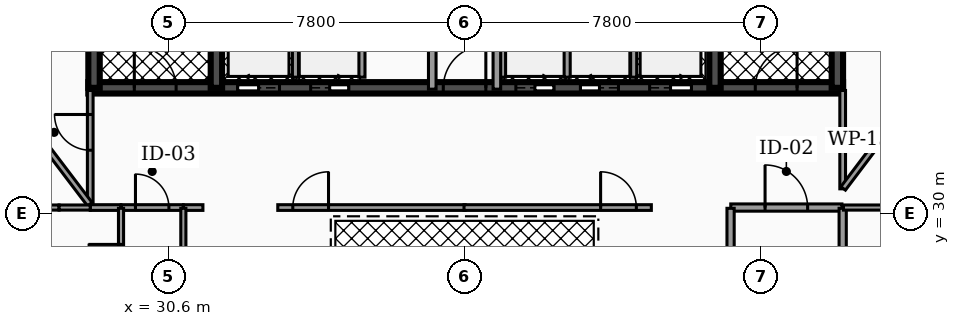
"""IFC4 building model, lengths in metres.
Left out: names, types, materials, properties, quantities, classifications, styles, units other than length and angle.
Written with IfcOpenShell. Run it as: python <this file> out.ifc"""

import sys

from ifc_helpers import new_model, si_unit, direction, frame, frame_2d, origin, place, context, subcontext, project, spatial, rectangle, extrude, element, fill, save


model = new_model("IFC4")
c1 = context("Model", 3, precision=1e-05, world=origin(), true_north=direction((0.0, 1.0)))
c2 = subcontext(c1, "Body", "Model", "MODEL_VIEW")
j1 = project(units=[si_unit("LENGTHUNIT", "METRE"), si_unit("PLANEANGLEUNIT", "RADIAN")], contexts=[c1])
p1 = place(None, origin())
s1 = spatial("IfcSite", under=j1, at=p1, CompositionType="ELEMENT")
p2 = place(p1, origin())
s2 = spatial("IfcBuilding", under=s1, at=p2, CompositionType="ELEMENT")
p3 = place(p2, frame((0.0, 0.0, 268.6)))
s3 = spatial("IfcBuildingStorey", under=s2, at=p3, CompositionType="ELEMENT", Elevation=268.6)
p4 = place(p3, frame((28.5, 33.3, 0.0), z_axis=(0.0, 0.0, 1.0), x_axis=(1.0, 0.0, 0.0)))
e1 = element("IfcWall", 1, at=p4, inside=s3, PredefinedType="SHEAR", context=c2, shape_type="SweptSolid", body=[
    extrude(rectangle(XDim=19.86, YDim=0.3, at=frame_2d((9.93, 0.0))), origin(), (0.0, 0.0, 1.0), 3.18),
])
p5 = place(p4, frame((3.93, 0.0, 0.0)))
e2 = element("IfcOpeningElement", 2, at=p5, cuts=e1, PredefinedType="OPENING", context=c2, shape_type="SweptSolid", body=[
    extrude(rectangle(XDim=1.1, YDim=2.15, at=frame_2d((0.55, 1.075))), frame((0.0, 0.16, 0.0), z_axis=(0.0, -1.0, 0.0), x_axis=(1.0, 0.0, 0.0)), (0.0, 0.0, 1.0), 0.32),
])
p6 = place(p4, frame((14.77, 0.0, 0.0)))
e3 = element("IfcOpeningElement", 3, at=p6, cuts=e1, PredefinedType="OPENING", context=c2, shape_type="SweptSolid", body=[
    extrude(rectangle(XDim=1.1, YDim=2.15, at=frame_2d((0.55, 1.075))), frame((0.0, 0.16, 0.0), z_axis=(0.0, -1.0, 0.0), x_axis=(1.0, 0.0, 0.0)), (0.0, 0.0, 1.0), 0.32),
])
p7 = place(p4, frame((11.25, 0.0, 0.0)))
e4 = element("IfcOpeningElement", 4, at=p7, cuts=e1, PredefinedType="OPENING", context=c2, shape_type="SweptSolid", body=[
    extrude(rectangle(XDim=1.0, YDim=2.1, at=frame_2d((0.5, 1.05))), frame((0.0, 0.16, 0.0), z_axis=(0.0, -1.0, 0.0), x_axis=(1.0, 0.0, 0.0)), (0.0, 0.0, 1.0), 0.32),
])
p8 = place(p4, frame((12.95, 0.0, 0.0)))
e5 = element("IfcOpeningElement", 5, at=p8, cuts=e1, PredefinedType="OPENING", context=c2, shape_type="SweptSolid", body=[
    extrude(rectangle(XDim=1.0, YDim=2.1, at=frame_2d((0.5, 1.05))), frame((0.0, 0.16, 0.0), z_axis=(0.0, -1.0, 0.0), x_axis=(1.0, 0.0, 0.0)), (0.0, 0.0, 1.0), 0.32),
])
p9 = place(p4, frame((5.85, 0.0, 0.0)))
e6 = element("IfcOpeningElement", 6, at=p9, cuts=e1, PredefinedType="OPENING", context=c2, shape_type="SweptSolid", body=[
    extrude(rectangle(XDim=1.0, YDim=2.1, at=frame_2d((0.5, 1.05))), frame((0.0, 0.16, 0.0), z_axis=(0.0, -1.0, 0.0), x_axis=(1.0, 0.0, 0.0)), (0.0, 0.0, 1.0), 0.32),
])
p10 = place(p4, frame((1.21, 0.0, 0.0)))
e7 = element("IfcOpeningElement", 7, at=p10, cuts=e1, PredefinedType="OPENING", context=c2, shape_type="SweptSolid", body=[
    extrude(rectangle(XDim=1.1, YDim=2.2, at=frame_2d((0.55, 1.1))), frame((0.0, 0.16, 0.0), z_axis=(0.0, -1.0, 0.0), x_axis=(1.0, 0.0, 0.0)), (0.0, 0.0, 1.0), 0.32),
])
p11 = place(p4, frame((9.34, 0.0, 0.0)))
e8 = element("IfcOpeningElement", 8, at=p11, cuts=e1, PredefinedType="OPENING", context=c2, shape_type="SweptSolid", body=[
    extrude(rectangle(XDim=1.12, YDim=2.05, at=frame_2d((0.56, 1.025))), frame((0.0, 0.16, 0.0), z_axis=(0.0, -1.0, 0.0), x_axis=(1.0, 0.0, 0.0)), (0.0, 0.0, 1.0), 0.32),
])
p12 = place(p4, frame((17.55, 0.0, 0.0)))
e9 = element("IfcOpeningElement", 9, at=p12, cuts=e1, PredefinedType="OPENING", context=c2, shape_type="SweptSolid", body=[
    extrude(rectangle(XDim=1.1, YDim=2.2, at=frame_2d((0.55, 1.1))), frame((0.0, 0.16, 0.0), z_axis=(0.0, -1.0, 0.0), x_axis=(1.0, 0.0, 0.0)), (0.0, 0.0, 1.0), 0.32),
])
for number, where, z_axis, x_axis in (
    (10, (28.65, 33.3, 0.0), (0.0, 0.0, 1.0), (0.0, 1.0, 0.0)),
    (11, (31.87, 33.3, 0.0), (0.0, 0.0, 1.0), (0.0, 1.0, 0.0)),
    (12, (44.99, 33.3, 0.0), (0.0, 0.0, 1.0), (0.0, 1.0, 0.0)),
    (13, (48.21, 33.3, 0.0), (0.0, 0.0, 1.0), (0.0, 1.0, 0.0)),
):
    element("IfcWall", number, at=place(p3, frame(where, z_axis=z_axis, x_axis=x_axis)), inside=s3, PredefinedType="SHEAR", context=c2, shape_type="SweptSolid", body=[
        extrude(rectangle(XDim=10.1, YDim=0.3, at=frame_2d((5.05, 0.0))), origin(), (0.0, 0.0, 1.0), 3.18),
    ])
for number, where, z_axis, x_axis in (
    (14, (33.95, 33.58, 0.0), (0.0, 0.0, 1.0), (0.0, 1.0, 0.0)),
    (15, (42.85, 33.58, 0.0), (0.0, 0.0, 1.0), (0.0, 1.0, 0.0)),
):
    element("IfcWall", number, at=place(p3, frame(where, z_axis=z_axis, x_axis=x_axis)), inside=s3, PredefinedType="SOLIDWALL", context=c2, shape_type="SweptSolid", body=[
        extrude(rectangle(XDim=2.45, YDim=0.16, at=frame_2d((1.225, 0.0))), origin(), (0.0, 0.0, 1.0), 3.18),
    ])
for number, where, z_axis, x_axis in (
    (16, (39.4, 33.58, 0.0), (0.0, 0.0, 1.0), (0.0, 1.0, 0.0)),
    (17, (41.1, 33.58, 0.0), (0.0, 0.0, 1.0), (0.0, 1.0, 0.0)),
    (18, (35.7, 33.58, 0.0), (0.0, 0.0, 1.0), (0.0, 1.0, 0.0)),
):
    element("IfcWall", number, at=place(p3, frame(where, z_axis=z_axis, x_axis=x_axis)), inside=s3, PredefinedType="SOLIDWALL", context=c2, shape_type="SweptSolid", body=[
        extrude(rectangle(XDim=2.25, YDim=0.16, at=frame_2d((1.125, 0.0))), origin(), (0.0, 0.0, 1.0), 3.18),
    ])
p13 = place(p3, frame((37.55, 33.265, 0.0), z_axis=(0.0, 0.0, 1.0), x_axis=(0.0, 1.0, 0.0)))
e19 = element("IfcWall", 19, at=p13, inside=s3, PredefinedType="PARTITIONING", context=c2, shape_type="SweptSolid", body=[
    extrude(rectangle(XDim=3.615, YDim=0.2, at=frame_2d((1.808, 0.0))), origin(), (0.0, 0.0, 1.0), 2.235),
])
p14 = place(p13, frame((1.367, 0.0, 0.0)))
e20 = element("IfcOpeningElement", 20, at=p14, cuts=e19, PredefinedType="OPENING", context=c2, shape_type="SweptSolid", body=[
    extrude(rectangle(XDim=0.88, YDim=2.05, at=frame_2d((0.44, 1.025))), frame((0.0, 0.11, 0.0), z_axis=(0.0, -1.0, 0.0), x_axis=(1.0, 0.0, 0.0)), (0.0, 0.0, 1.0), 0.22),
])
p15 = place(p3, frame((39.25, 33.265, 0.0), z_axis=(0.0, 0.0, 1.0), x_axis=(0.0, 1.0, 0.0)))
e21 = element("IfcWall", 21, at=p15, inside=s3, PredefinedType="PARTITIONING", context=c2, shape_type="SweptSolid", body=[
    extrude(rectangle(XDim=3.615, YDim=0.2, at=frame_2d((1.808, 0.0))), origin(), (0.0, 0.0, 1.0), 2.235),
])
p16 = place(p3, frame((45.405, 30.15, 0.0), z_axis=(0.0, 0.0, 1.0), x_axis=(1.0, 0.0, 0.0)))
e22 = element("IfcWall", 22, at=p16, inside=s3, PredefinedType="PARTITIONING", context=c2, shape_type="SweptSolid", body=[
    extrude(rectangle(XDim=2.925, YDim=0.19, at=frame_2d((1.462, 0.0))), origin(), (0.0, 0.0, 1.0), 2.235),
])
p17 = place(p16, frame((0.903, 0.0, 0.0)))
e23 = element("IfcOpeningElement", 23, at=p17, cuts=e22, PredefinedType="OPENING", context=c2, shape_type="SweptSolid", body=[
    extrude(rectangle(XDim=1.12, YDim=2.05, at=frame_2d((0.56, 1.025))), frame((0.0, 0.105, 0.0), z_axis=(0.0, -1.0, 0.0), x_axis=(1.0, 0.0, 0.0)), (0.0, 0.0, 1.0), 0.21),
])
p18 = place(p3, frame((28.55, 30.227, 0.0), z_axis=(0.0, 0.0, 1.0), x_axis=(0.0, 1.0, 0.0)))
e24 = element("IfcWall", 24, at=p18, inside=s3, PredefinedType="PARTITIONING", context=c2, shape_type="SweptSolid", body=[
    extrude(rectangle(XDim=3.003, YDim=0.15, at=frame_2d((1.501, 0.0))), origin(), (0.0, 0.0, 1.0), 2.235),
])
p19 = place(p18, frame((1.431, 0.0, 0.0)))
e25 = element("IfcOpeningElement", 25, at=p19, cuts=e24, PredefinedType="OPENING", context=c2, shape_type="SweptSolid", body=[
    extrude(rectangle(XDim=0.94, YDim=2.05, at=frame_2d((0.47, 1.025))), frame((0.0, 0.085, 0.0), z_axis=(0.0, -1.0, 0.0), x_axis=(1.0, 0.0, 0.0)), (0.0, 0.0, 1.0), 0.17),
])
p20 = place(p3, frame((48.35, 30.643, 0.0), z_axis=(0.0, 0.0, 1.0), x_axis=(0.0, 1.0, 0.0)))
e26 = element("IfcWall", 26, at=p20, inside=s3, PredefinedType="PARTITIONING", context=c2, shape_type="SweptSolid", body=[
    extrude(rectangle(XDim=2.587, YDim=0.15, at=frame_2d((1.294, 0.0))), origin(), (0.0, 0.0, 1.0), 2.235),
])
p21 = place(p3, frame((29.365, 30.15, 0.0), z_axis=(0.0, 0.0, 1.0), x_axis=(1.0, 0.0, 0.0)))
e27 = element("IfcWall", 27, at=p21, inside=s3, PredefinedType="PARTITIONING", context=c2, shape_type="SweptSolid", body=[
    extrude(rectangle(XDim=1.63, YDim=0.15, at=frame_2d((0.815, 0.0))), origin(), (0.0, 0.0, 1.0), 2.235),
])
p22 = place(p21, frame((0.375, 0.0, 0.0)))
e28 = element("IfcOpeningElement", 28, at=p22, cuts=e27, PredefinedType="OPENING", context=c2, shape_type="SweptSolid", body=[
    extrude(rectangle(XDim=0.88, YDim=2.05, at=frame_2d((0.44, 1.025))), frame((0.0, 0.085, 0.0), z_axis=(0.0, -1.0, 0.0), x_axis=(1.0, 0.0, 0.0)), (0.0, 0.0, 1.0), 0.17),
])
p23 = place(p3, frame((28.55, 30.15, 0.0), z_axis=(0.0, 0.0, 1.0), x_axis=(1.0, 0.0, 0.0)))
e29 = element("IfcWall", 29, at=p23, inside=s3, PredefinedType="PARTITIONING", context=c2, shape_type="SweptSolid", body=[
    extrude(rectangle(XDim=0.805, YDim=0.15, at=frame_2d((0.402, 0.0))), origin(), (0.0, 0.0, 1.0), 2.235),
])
p24 = place(p3, frame((33.485, 30.15, 0.0), z_axis=(0.0, 0.0, 1.0), x_axis=(1.0, 0.0, 0.0)))
e30 = element("IfcWall", 30, at=p24, inside=s3, PredefinedType="PARTITIONING", context=c2, shape_type="SweptSolid", body=[
    extrude(rectangle(XDim=4.93, YDim=0.15, at=frame_2d((2.465, 0.0))), origin(), (0.0, 0.0, 1.0), 2.235),
])
p25 = place(p24, frame((0.395, 0.0, 0.0)))
e31 = element("IfcOpeningElement", 31, at=p25, cuts=e30, PredefinedType="OPENING", context=c2, shape_type="SweptSolid", body=[
    extrude(rectangle(XDim=0.94, YDim=2.05, at=frame_2d((0.47, 1.025))), frame((0.0, 0.085, 0.0), z_axis=(0.0, -1.0, 0.0), x_axis=(1.0, 0.0, 0.0)), (0.0, 0.0, 1.0), 0.17),
])
p26 = place(p3, frame((31.005, 30.15, 0.0), z_axis=(0.0, 0.0, 1.0), x_axis=(1.0, 0.0, 0.0)))
e32 = element("IfcWall", 32, at=p26, inside=s3, PredefinedType="PARTITIONING", context=c2, shape_type="SweptSolid", body=[
    extrude(rectangle(XDim=0.51, YDim=0.15, at=frame_2d((0.255, 0.0))), origin(), (0.0, 0.0, 1.0), 2.235),
])
p27 = place(p3, frame((38.385, 30.15, 0.0), z_axis=(0.0, 0.0, 1.0), x_axis=(1.0, 0.0, 0.0)))
e33 = element("IfcWall", 33, at=p27, inside=s3, PredefinedType="PARTITIONING", context=c2, shape_type="SweptSolid", body=[
    extrude(rectangle(XDim=4.93, YDim=0.15, at=frame_2d((2.465, 0.0))), origin(), (0.0, 0.0, 1.0), 2.235),
])
p28 = place(p27, frame((3.595, 0.0, 0.0)))
e34 = element("IfcOpeningElement", 34, at=p28, cuts=e33, PredefinedType="OPENING", context=c2, shape_type="SweptSolid", body=[
    extrude(rectangle(XDim=0.94, YDim=2.05, at=frame_2d((0.47, 1.025))), frame((0.0, 0.085, 0.0), z_axis=(0.0, -1.0, 0.0), x_axis=(1.0, 0.0, 0.0)), (0.0, 0.0, 1.0), 0.17),
])
for number, where, z_axis, x_axis in (
    (35, (45.4, 27.37, 0.0), (0.0, 0.0, 1.0), (0.0, 1.0, 0.0)),
    (36, (48.35, 27.37, 0.0), (0.0, 0.0, 1.0), (0.0, 1.0, 0.0)),
):
    element("IfcWall", number, at=place(p3, frame(where, z_axis=z_axis, x_axis=x_axis)), inside=s3, PredefinedType="PARTITIONING", context=c2, shape_type="SweptSolid", body=[
        extrude(rectangle(XDim=2.76, YDim=0.19, at=frame_2d((1.38, 0.0))), origin(), (0.0, 0.0, 1.0), 2.235),
    ])
p29 = place(p3, frame((26.562, 32.84, 0.0), z_axis=(0.0, 0.0, 1.0), x_axis=(0.604783852999, -0.796389660375, 0.0)))
e37 = element("IfcWall", 37, at=p29, inside=s3, PredefinedType="PARTITIONING", context=c2, shape_type="SweptSolid", body=[
    extrude(rectangle(XDim=3.267, YDim=0.15, at=frame_2d((1.634, 0.0))), origin(), (0.0, 0.0, 1.0), 2.235),
])
p30 = place(p3, frame((48.362, 30.654, 0.0), z_axis=(0.0, 0.0, 1.0), x_axis=(0.603189668488, 0.79759778324, 0.0)))
e38 = element("IfcWall", 38, at=p30, inside=s3, PredefinedType="PARTITIONING", context=c2, shape_type="SweptSolid", body=[
    extrude(rectangle(XDim=2.886, YDim=0.15, at=frame_2d((1.443, 0.0))), origin(), (0.0, 0.0, 1.0), 2.235),
])
p31 = place(p3, frame((29.36, 27.37, 0.0), z_axis=(0.0, 0.0, 1.0), x_axis=(0.0, 1.0, 0.0)))
e39 = element("IfcWall", 39, at=p31, inside=s3, PredefinedType="PARTITIONING", context=c2, shape_type="SweptSolid", body=[
    extrude(rectangle(XDim=2.76, YDim=0.135, at=frame_2d((1.38, 0.0))), origin(), (0.0, 0.0, 1.0), 2.235),
])
p32 = place(p31, frame((0.95, 0.0, 0.0)))
e40 = element("IfcOpeningElement", 40, at=p32, cuts=e39, PredefinedType="OPENING", context=c2, shape_type="SweptSolid", body=[
    extrude(rectangle(XDim=0.86, YDim=2.05, at=frame_2d((0.43, 1.025))), frame((0.0, 0.077, 0.0), z_axis=(0.0, -1.0, 0.0), x_axis=(1.0, 0.0, 0.0)), (0.0, 0.0, 1.0), 0.155),
])
p33 = place(p3, frame((31.0, 27.37, 0.0), z_axis=(0.0, 0.0, 1.0), x_axis=(0.0, 1.0, 0.0)))
e41 = element("IfcWall", 41, at=p33, inside=s3, PredefinedType="PARTITIONING", context=c2, shape_type="SweptSolid", body=[
    extrude(rectangle(XDim=2.76, YDim=0.135, at=frame_2d((1.38, 0.0))), origin(), (0.0, 0.0, 1.0), 2.235),
])
p34 = place(p3, frame((26.12, 30.15, 0.0), z_axis=(0.0, 0.0, 1.0), x_axis=(1.0, 0.0, 0.0)))
e42 = element("IfcWall", 42, at=p34, inside=s3, PredefinedType="PARTITIONING", context=c2, shape_type="SweptSolid", body=[
    extrude(rectangle(XDim=1.61, YDim=0.135, at=frame_2d((0.805, 0.0))), origin(), (0.0, 0.0, 1.0), 2.235),
])
p35 = place(p3, frame((27.73, 30.15, 0.0), z_axis=(0.0, 0.0, 1.0), x_axis=(1.0, 0.0, 0.0)))
e43 = element("IfcWall", 43, at=p35, inside=s3, PredefinedType="PARTITIONING", context=c2, shape_type="SweptSolid", body=[
    extrude(rectangle(XDim=0.82, YDim=0.135, at=frame_2d((0.41, 0.0))), origin(), (0.0, 0.0, 1.0), 2.235),
])
p36 = place(p3, frame((48.37, 30.15, 0.0), z_axis=(0.0, 0.0, 1.0), x_axis=(1.0, 0.0, 0.0)))
e44 = element("IfcWall", 44, at=p36, inside=s3, PredefinedType="PARTITIONING", context=c2, shape_type="SweptSolid", body=[
    extrude(rectangle(XDim=2.68, YDim=0.135, at=frame_2d((1.34, 0.0))), origin(), (0.0, 0.0, 1.0), 2.235),
])
p37 = place(p5, origin())
e45 = element("IfcDoor", 45, at=p37, inside=s3, OperationType="SLIDING_TO_LEFT", PredefinedType="DOOR", context=c2, shape_type="SweptSolid", body=[
    extrude(rectangle(XDim=1.1, YDim=2.15, at=frame_2d((0.55, 1.075))), frame((0.0, 0.025, 0.0), z_axis=(0.0, -1.0, 0.0), x_axis=(1.0, 0.0, 0.0)), (0.0, 0.0, 1.0), 0.05),
])
fill(e2, e45)
p38 = place(p6, origin())
e46 = element("IfcDoor", 46, at=p38, inside=s3, OperationType="SLIDING_TO_RIGHT", PredefinedType="DOOR", context=c2, shape_type="SweptSolid", body=[
    extrude(rectangle(XDim=1.1, YDim=2.15, at=frame_2d((0.55, 1.075))), frame((0.0, 0.025, 0.0), z_axis=(0.0, -1.0, 0.0), x_axis=(1.0, 0.0, 0.0)), (0.0, 0.0, 1.0), 0.05),
])
fill(e3, e46)
p39 = place(p7, origin())
e47 = element("IfcDoor", 47, at=p39, inside=s3, OperationType="SLIDING_TO_RIGHT", PredefinedType="DOOR", context=c2, shape_type="SweptSolid", body=[
    extrude(rectangle(XDim=1.0, YDim=2.1, at=frame_2d((0.5, 1.05))), frame((0.0, 0.025, 0.0), z_axis=(0.0, -1.0, 0.0), x_axis=(1.0, 0.0, 0.0)), (0.0, 0.0, 1.0), 0.05),
])
fill(e4, e47)
p40 = place(p8, origin())
e48 = element("IfcDoor", 48, at=p40, inside=s3, OperationType="SLIDING_TO_LEFT", PredefinedType="DOOR", context=c2, shape_type="SweptSolid", body=[
    extrude(rectangle(XDim=1.0, YDim=2.1, at=frame_2d((0.5, 1.05))), frame((0.0, 0.025, 0.0), z_axis=(0.0, -1.0, 0.0), x_axis=(1.0, 0.0, 0.0)), (0.0, 0.0, 1.0), 0.05),
])
fill(e5, e48)
p41 = place(p9, origin())
e49 = element("IfcDoor", 49, at=p41, inside=s3, OperationType="SLIDING_TO_RIGHT", PredefinedType="DOOR", context=c2, shape_type="SweptSolid", body=[
    extrude(rectangle(XDim=1.0, YDim=2.1, at=frame_2d((0.5, 1.05))), frame((0.0, 0.025, 0.0), z_axis=(0.0, -1.0, 0.0), x_axis=(1.0, 0.0, 0.0)), (0.0, 0.0, 1.0), 0.05),
])
fill(e6, e49)
p42 = place(p10, origin())
e50 = element("IfcDoor", 50, at=p42, inside=s3, OperationType="SINGLE_SWING_LEFT", PredefinedType="DOOR", context=c2, shape_type="SweptSolid", body=[
    extrude(rectangle(XDim=1.1, YDim=2.2, at=frame_2d((0.55, 1.1))), frame((0.0, 0.025, 0.0), z_axis=(0.0, -1.0, 0.0), x_axis=(1.0, 0.0, 0.0)), (0.0, 0.0, 1.0), 0.05),
])
fill(e7, e50)
p43 = place(p11, origin())
e51 = element("IfcDoor", 51, at=p43, inside=s3, OperationType="SINGLE_SWING_RIGHT", PredefinedType="DOOR", context=c2, shape_type="SweptSolid", body=[
    extrude(rectangle(XDim=1.12, YDim=2.05, at=frame_2d((0.56, 1.025))), frame((0.0, 0.025, 0.0), z_axis=(0.0, -1.0, 0.0), x_axis=(1.0, 0.0, 0.0)), (0.0, 0.0, 1.0), 0.05),
])
fill(e8, e51)
p44 = place(p12, origin())
e52 = element("IfcDoor", 52, at=p44, inside=s3, OperationType="SINGLE_SWING_RIGHT", PredefinedType="DOOR", context=c2, shape_type="SweptSolid", body=[
    extrude(rectangle(XDim=1.1, YDim=2.2, at=frame_2d((0.55, 1.1))), frame((0.0, 0.025, 0.0), z_axis=(0.0, -1.0, 0.0), x_axis=(1.0, 0.0, 0.0)), (0.0, 0.0, 1.0), 0.05),
])
fill(e9, e52)
p45 = place(p17, origin())
e53 = element("IfcDoor", 53, at=p45, inside=s3, OperationType="SINGLE_SWING_LEFT", PredefinedType="DOOR", context=c2, shape_type="SweptSolid", body=[
    extrude(rectangle(XDim=1.12, YDim=2.05, at=frame_2d((0.56, 1.025))), frame((0.0, 0.025, 0.0), z_axis=(0.0, -1.0, 0.0), x_axis=(1.0, 0.0, 0.0)), (0.0, 0.0, 1.0), 0.05),
])
fill(e23, e53)
p46 = place(p19, origin())
e54 = element("IfcDoor", 54, at=p46, inside=s3, OperationType="SINGLE_SWING_RIGHT", PredefinedType="DOOR", context=c2, shape_type="SweptSolid", body=[
    extrude(rectangle(XDim=0.94, YDim=2.05, at=frame_2d((0.47, 1.025))), frame((0.0, 0.025, 0.0), z_axis=(0.0, -1.0, 0.0), x_axis=(1.0, 0.0, 0.0)), (0.0, 0.0, 1.0), 0.05),
])
fill(e25, e54)
p47 = place(p22, origin())
e55 = element("IfcDoor", 55, at=p47, inside=s3, OperationType="SINGLE_SWING_LEFT", PredefinedType="DOOR", context=c2, shape_type="SweptSolid", body=[
    extrude(rectangle(XDim=0.88, YDim=2.05, at=frame_2d((0.44, 1.025))), frame((0.0, 0.025, 0.0), z_axis=(0.0, -1.0, 0.0), x_axis=(1.0, 0.0, 0.0)), (0.0, 0.0, 1.0), 0.05),
])
fill(e28, e55)
p48 = place(p25, origin())
e56 = element("IfcDoor", 56, at=p48, inside=s3, OperationType="SINGLE_SWING_RIGHT", PredefinedType="DOOR", context=c2, shape_type="SweptSolid", body=[
    extrude(rectangle(XDim=0.94, YDim=2.05, at=frame_2d((0.47, 1.025))), frame((0.0, 0.025, 0.0), z_axis=(0.0, -1.0, 0.0), x_axis=(1.0, 0.0, 0.0)), (0.0, 0.0, 1.0), 0.05),
])
fill(e31, e56)
p49 = place(p28, origin())
e57 = element("IfcDoor", 57, at=p49, inside=s3, OperationType="SINGLE_SWING_LEFT", PredefinedType="DOOR", context=c2, shape_type="SweptSolid", body=[
    extrude(rectangle(XDim=0.94, YDim=2.05, at=frame_2d((0.47, 1.025))), frame((0.0, 0.025, 0.0), z_axis=(0.0, -1.0, 0.0), x_axis=(1.0, 0.0, 0.0)), (0.0, 0.0, 1.0), 0.05),
])
fill(e34, e57)
p50 = place(p32, origin())
e58 = element("IfcDoor", 58, at=p50, inside=s3, OperationType="SINGLE_SWING_RIGHT", PredefinedType="DOOR", context=c2, shape_type="SweptSolid", body=[
    extrude(rectangle(XDim=0.86, YDim=2.05, at=frame_2d((0.43, 1.025))), frame((0.0, 0.025, 0.0), z_axis=(0.0, -1.0, 0.0), x_axis=(1.0, 0.0, 0.0)), (0.0, 0.0, 1.0), 0.05),
])
fill(e40, e58)
save(model, sys.argv[1])
